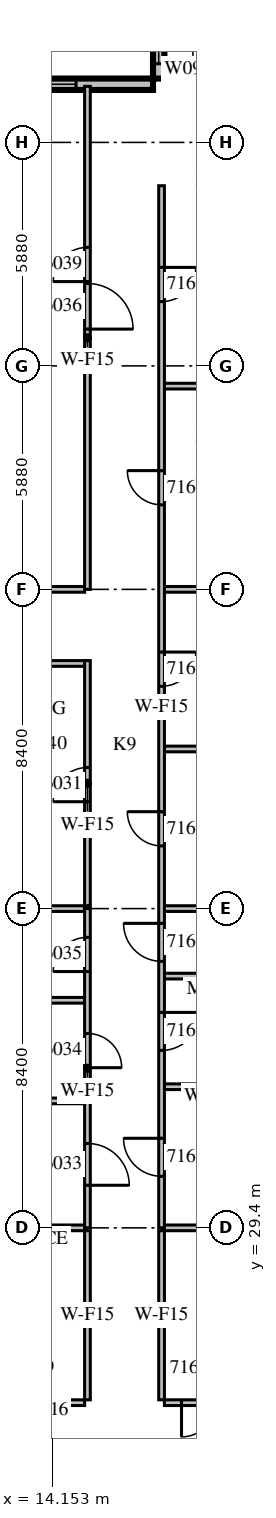
"""IFC4 building model, lengths in metres.
Left out: names, types, materials, properties, quantities, classifications, styles, units other than length and angle.
Written with IfcOpenShell. Run it as: python <this file> out.ifc"""

import sys

from ifc_helpers import new_model, si_unit, direction, frame, frame_2d, origin, place, context, subcontext, project, spatial, rectangle, extrude, source, transform, mapped, element, fill, save


model = new_model("IFC4")
c1 = context("Model", 3, precision=1e-05, world=origin(), true_north=direction((0.0, 1.0)))
c2 = subcontext(c1, "Body", "Model", "MODEL_VIEW")
j1 = project(units=[si_unit("LENGTHUNIT", "METRE"), si_unit("PLANEANGLEUNIT", "RADIAN")], contexts=[c1])
p1 = place(None, origin())
s1 = spatial("IfcSite", under=j1, at=p1, CompositionType="ELEMENT")
p2 = place(p1, origin())
s2 = spatial("IfcBuilding", under=s1, at=p2, CompositionType="ELEMENT")
p3 = place(p2, frame((0.0, 0.0, 78.3)))
s3 = spatial("IfcBuildingStorey", under=s2, at=p3, CompositionType="ELEMENT", Elevation=78.3)
m1 = source(origin(), c2, "Body", "SweptSolid", [
    extrude(rectangle(XDim=1.68, YDim=0.3, at=frame_2d((0.84, 0.0))), origin(), (0.0, 0.0, 1.0), 3.8),
])
p4 = place(p3, frame((16.95, 61.32, 0.0), z_axis=(0.0, 0.0, 1.0), x_axis=(0.0, -1.0, 0.0)))
e1 = element("IfcWall", 1, at=p4, inside=s3, PredefinedType="STANDARD", context=c2, shape_type="MappedRepresentation", body=[
    mapped(m1, transform((0.0, 0.0, 0.0), scale=1.0)),
])
m2 = source(origin(), c2, "Body", "SweptSolid", [
    extrude(rectangle(XDim=0.9, YDim=2.7, at=frame_2d((0.45, 1.35))), frame((0.0, 0.16, 0.0), z_axis=(0.0, -1.0, 0.0), x_axis=(1.0, 0.0, 0.0)), (0.0, 0.0, 1.0), 0.32),
])
p5 = place(p4, frame((0.39, 0.0, 0.6)))
e2 = element("IfcOpeningElement", 2, at=p5, cuts=e1, PredefinedType="OPENING", context=c2, shape_type="MappedRepresentation", body=[
    mapped(m2, transform((0.0, 0.0, 0.0), scale=1.0)),
])
p6 = place(p3, frame((16.8, 59.49, 0.0), z_axis=(0.0, 0.0, 1.0), x_axis=(-1.0, 0.0, 0.0)))
e3 = element("IfcWall", 3, at=p6, inside=s3, PredefinedType="STANDARD", context=c2, shape_type="SweptSolid", body=[
    extrude(rectangle(XDim=8.2, YDim=0.3, at=frame_2d((4.1, 0.0))), origin(), (0.0, 0.0, 1.0), 3.8),
])
m3 = source(origin(), c2, "Body", "SweptSolid", [
    extrude(rectangle(XDim=1.8, YDim=2.4, at=frame_2d((0.9, 1.2))), frame((0.0, 0.16, 0.0), z_axis=(0.0, -1.0, 0.0), x_axis=(1.0, 0.0, 0.0)), (0.0, 0.0, 1.0), 0.32),
])
p7 = place(p6, frame((2.025, 0.0, 0.0)))
e4 = element("IfcOpeningElement", 4, at=p7, cuts=e3, PredefinedType="OPENING", context=c2, shape_type="MappedRepresentation", body=[
    mapped(m3, transform((0.0, 0.0, 0.0), scale=1.0)),
])
m4 = source(origin(), c2, "Body", "SweptSolid", [
    extrude(rectangle(XDim=4.295, YDim=0.15, at=frame_2d((2.147, 0.0))), origin(), (0.0, 0.0, 1.0), 3.8),
])
p8 = place(p3, frame((10.705, 24.8, 0.0), z_axis=(0.0, 0.0, 1.0), x_axis=(1.0, 0.0, 0.0)))
e5 = element("IfcWall", 5, at=p8, inside=s3, PredefinedType="PARTITIONING", context=c2, shape_type="MappedRepresentation", body=[
    mapped(m4, transform((0.0, 0.0, 0.0), scale=1.0)),
])
m5 = source(origin(), c2, "Body", "SweptSolid", [
    extrude(rectangle(XDim=0.9, YDim=2.1, at=frame_2d((0.45, 1.05))), frame((0.0, 0.085, 0.0), z_axis=(0.0, -1.0, 0.0), x_axis=(1.0, 0.0, 0.0)), (0.0, 0.0, 1.0), 0.17),
])
p9 = place(p8, frame((2.283, 0.0, 0.0)))
e6 = element("IfcOpeningElement", 6, at=p9, cuts=e5, PredefinedType="OPENING", context=c2, shape_type="MappedRepresentation", body=[
    mapped(m5, transform((0.0, 0.0, 0.0), scale=1.0)),
])
m6 = source(origin(), c2, "Body", "SweptSolid", [
    extrude(rectangle(XDim=3.6, YDim=0.15, at=frame_2d((1.8, 0.0))), origin(), (0.0, 0.0, 1.0), 3.8),
])
p10 = place(p3, frame((17.1, 24.8, 0.0), z_axis=(0.0, 0.0, 1.0), x_axis=(1.0, 0.0, 0.0)))
e7 = element("IfcWall", 7, at=p10, inside=s3, PredefinedType="PARTITIONING", context=c2, shape_type="MappedRepresentation", body=[
    mapped(m6, transform((0.0, 0.0, 0.0), scale=1.0)),
])
p11 = place(p10, frame((0.45, 0.0, 0.0)))
e8 = element("IfcOpeningElement", 8, at=p11, cuts=e7, PredefinedType="OPENING", context=c2, shape_type="MappedRepresentation", body=[
    mapped(m5, transform((0.0, 0.0, 0.0), scale=1.0)),
])
m7 = source(origin(), c2, "Body", "SweptSolid", [
    extrude(rectangle(XDim=4.45, YDim=0.15, at=frame_2d((2.225, 0.0))), origin(), (0.0, 0.0, 1.0), 3.8),
])
for number, where, z_axis, x_axis in (
    (9, (15.075, 24.875, 0.0), (0.0, 0.0, 1.0), (0.0, 1.0, 0.0)),
    (10, (17.025, 29.325, 0.0), (0.0, 0.0, 1.0), (0.0, -1.0, 0.0)),
):
    element("IfcWall", number, at=place(p3, frame(where, z_axis=z_axis, x_axis=x_axis)), inside=s3, PredefinedType="PARTITIONING", context=c2, shape_type="MappedRepresentation", body=[
        mapped(m7, transform((0.0, 0.0, 0.0), scale=1.0)),
    ])
m8 = source(origin(), c2, "Body", "SweptSolid", [
    extrude(rectangle(XDim=3.901, YDim=0.15, at=frame_2d((1.95, 0.0))), origin(), (0.0, 0.0, 1.0), 3.8),
])
p12 = place(p3, frame((15.0, 29.4, 0.0), z_axis=(0.0, 0.0, 1.0), x_axis=(-1.0, 0.0, 0.0)))
e11 = element("IfcWall", 11, at=p12, inside=s3, PredefinedType="PARTITIONING", context=c2, shape_type="MappedRepresentation", body=[
    mapped(m8, transform((0.0, 0.0, 0.0), scale=1.0)),
])
m9 = source(origin(), c2, "Body", "SweptSolid", [
    extrude(rectangle(XDim=2.701, YDim=0.15, at=frame_2d((1.351, 0.0))), origin(), (0.0, 0.0, 1.0), 3.8),
])
p13 = place(p3, frame((19.801, 29.4, 0.0), z_axis=(0.0, 0.0, 1.0), x_axis=(-1.0, 0.0, 0.0)))
e12 = element("IfcWall", 12, at=p13, inside=s3, PredefinedType="PARTITIONING", context=c2, shape_type="MappedRepresentation", body=[
    mapped(m9, transform((0.0, 0.0, 0.0), scale=1.0)),
])
m10 = source(origin(), c2, "Body", "SweptSolid", [
    extrude(rectangle(XDim=3.575, YDim=0.15, at=frame_2d((1.788, 0.0))), origin(), (0.0, 0.0, 1.0), 3.8),
])
p14 = place(p3, frame((15.075, 44.25, 0.0), z_axis=(0.0, 0.0, 1.0), x_axis=(-1.0, 0.0, 0.0)))
e13 = element("IfcWall", 13, at=p14, inside=s3, PredefinedType="PARTITIONING", context=c2, shape_type="MappedRepresentation", body=[
    mapped(m10, transform((0.0, 0.0, 0.0), scale=1.0)),
])
m11 = source(origin(), c2, "Body", "SweptSolid", [
    extrude(rectangle(XDim=6.45, YDim=0.15, at=frame_2d((3.225, 0.0))), origin(), (0.0, 0.0, 1.0), 3.8),
])
p15 = place(p3, frame((15.075, 37.875, 0.0), z_axis=(0.0, 0.0, 1.0), x_axis=(0.0, 1.0, 0.0)))
e14 = element("IfcWall", 14, at=p15, inside=s3, PredefinedType="PARTITIONING", context=c2, shape_type="MappedRepresentation", body=[
    mapped(m11, transform((0.0, 0.0, 0.0), scale=1.0)),
])
p16 = place(p15, frame((2.737, 0.0, 0.0)))
e15 = element("IfcOpeningElement", 15, at=p16, cuts=e14, PredefinedType="OPENING", context=c2, shape_type="MappedRepresentation", body=[
    mapped(m5, transform((0.0, 0.0, 0.0), scale=1.0)),
])
for number, where, z_axis, x_axis in (
    (16, (15.0, 32.74, 0.0), (0.0, 0.0, 1.0), (-1.0, 0.0, 0.0)),
    (17, (15.0, 35.388, 0.0), (0.0, 0.0, 1.0), (-1.0, 0.0, 0.0)),
):
    element("IfcWall", number, at=place(p3, frame(where, z_axis=z_axis, x_axis=x_axis)), inside=s3, PredefinedType="PARTITIONING", context=c2, shape_type="MappedRepresentation", body=[
        mapped(m4, transform((0.0, 0.0, 0.0), scale=1.0)),
    ])
p17 = place(p3, frame((15.0, 37.8, 0.0), z_axis=(0.0, 0.0, 1.0), x_axis=(-1.0, 0.0, 0.0)))
e18 = element("IfcWall", 18, at=p17, inside=s3, PredefinedType="PARTITIONING", context=c2, shape_type="MappedRepresentation", body=[
    mapped(m8, transform((0.0, 0.0, 0.0), scale=1.0)),
])
m12 = source(origin(), c2, "Body", "SweptSolid", [
    extrude(rectangle(XDim=3.75, YDim=0.15, at=frame_2d((1.875, 0.0))), origin(), (0.0, 0.0, 1.0), 3.8),
])
p18 = place(p3, frame((15.0, 46.2, 0.0), z_axis=(0.0, 0.0, 1.0), x_axis=(-1.0, 0.0, 0.0)))
e19 = element("IfcWall", 19, at=p18, inside=s3, PredefinedType="PARTITIONING", context=c2, shape_type="MappedRepresentation", body=[
    mapped(m12, transform((0.0, 0.0, 0.0), scale=1.0)),
])
for number, where, z_axis, x_axis in (
    (20, (17.1, 33.113, 0.0), (0.0, 0.0, 1.0), (1.0, 0.0, 0.0)),
    (21, (17.1, 36.024, 0.0), (0.0, 0.0, 1.0), (1.0, 0.0, 0.0)),
    (22, (17.1, 42.0, 0.0), (0.0, 0.0, 1.0), (1.0, 0.0, 0.0)),
):
    element("IfcWall", number, at=place(p3, frame(where, z_axis=z_axis, x_axis=x_axis)), inside=s3, PredefinedType="PARTITIONING", context=c2, shape_type="MappedRepresentation", body=[
        mapped(m6, transform((0.0, 0.0, 0.0), scale=1.0)),
    ])
for number, where, z_axis, x_axis in (
    (23, (17.1, 51.547, 0.0), (0.0, 0.0, 1.0), (1.0, 0.0, 0.0)),
    (24, (19.801, 37.8, 0.0), (0.0, 0.0, 1.0), (-1.0, 0.0, 0.0)),
    (25, (19.801, 46.2, 0.0), (0.0, 0.0, 1.0), (-1.0, 0.0, 0.0)),
):
    element("IfcWall", number, at=place(p3, frame(where, z_axis=z_axis, x_axis=x_axis)), inside=s3, PredefinedType="PARTITIONING", context=c2, shape_type="MappedRepresentation", body=[
        mapped(m9, transform((0.0, 0.0, 0.0), scale=1.0)),
    ])
m13 = source(origin(), c2, "Body", "SweptSolid", [
    extrude(rectangle(XDim=8.4, YDim=0.15, at=frame_2d((4.2, 0.0))), origin(), (0.0, 0.0, 1.0), 3.8),
])
p19 = place(p3, frame((15.075, 29.4, 0.0), z_axis=(0.0, 0.0, 1.0), x_axis=(0.0, 1.0, 0.0)))
e26 = element("IfcWall", 26, at=p19, inside=s3, PredefinedType="PARTITIONING", context=c2, shape_type="MappedRepresentation", body=[
    mapped(m13, transform((0.0, 0.0, 0.0), scale=1.0)),
])
m14 = source(origin(), c2, "Body", "SweptSolid", [
    extrude(rectangle(XDim=1.1, YDim=2.1, at=frame_2d((0.55, 1.05))), frame((0.0, 0.085, 0.0), z_axis=(0.0, -1.0, 0.0), x_axis=(1.0, 0.0, 0.0)), (0.0, 0.0, 1.0), 0.17),
])
p20 = place(p19, frame((1.12, 0.0, 0.0)))
e27 = element("IfcOpeningElement", 27, at=p20, cuts=e26, PredefinedType="OPENING", context=c2, shape_type="MappedRepresentation", body=[
    mapped(m14, transform((0.0, 0.0, 0.0), scale=1.0)),
])
p21 = place(p19, frame((4.214, 0.0, 0.0)))
e28 = element("IfcOpeningElement", 28, at=p21, cuts=e26, PredefinedType="OPENING", context=c2, shape_type="MappedRepresentation", body=[
    mapped(m5, transform((0.0, 0.0, 0.0), scale=1.0)),
])
p22 = place(p19, frame((6.744, 0.0, 0.0)))
e29 = element("IfcOpeningElement", 29, at=p22, cuts=e26, PredefinedType="OPENING", context=c2, shape_type="MappedRepresentation", body=[
    mapped(m5, transform((0.0, 0.0, 0.0), scale=1.0)),
])
m15 = source(origin(), c2, "Body", "SweptSolid", [
    extrude(rectangle(XDim=13.235, YDim=0.15, at=frame_2d((6.617, 0.0))), origin(), (0.0, 0.0, 1.0), 3.8),
])
p23 = place(p3, frame((15.075, 46.2, 0.0), z_axis=(0.0, 0.0, 1.0), x_axis=(0.0, 1.0, 0.0)))
e30 = element("IfcWall", 30, at=p23, inside=s3, PredefinedType="PARTITIONING", context=c2, shape_type="MappedRepresentation", body=[
    mapped(m15, transform((0.0, 0.0, 0.0), scale=1.0)),
])
m16 = source(origin(), c2, "Body", "SweptSolid", [
    extrude(rectangle(XDim=1.2, YDim=2.1, at=frame_2d((0.6, 1.05))), frame((0.0, 0.085, 0.0), z_axis=(0.0, -1.0, 0.0), x_axis=(1.0, 0.0, 0.0)), (0.0, 0.0, 1.0), 0.17),
])
p24 = place(p23, frame((6.848, 0.0, 0.0)))
e31 = element("IfcOpeningElement", 31, at=p24, cuts=e30, PredefinedType="OPENING", context=c2, shape_type="MappedRepresentation", body=[
    mapped(m16, transform((0.0, 0.0, 0.0), scale=1.0)),
])
p25 = place(p23, frame((8.098, 0.0, 0.0)))
e32 = element("IfcOpeningElement", 32, at=p25, cuts=e30, PredefinedType="OPENING", context=c2, shape_type="MappedRepresentation", body=[
    mapped(m5, transform((0.0, 0.0, 0.0), scale=1.0)),
])
p26 = place(p3, frame((17.025, 56.82, 0.0), z_axis=(0.0, 0.0, 1.0), x_axis=(0.0, -1.0, 0.0)))
e33 = element("IfcWall", 33, at=p26, inside=s3, PredefinedType="PARTITIONING", context=c2, shape_type="SweptSolid", body=[
    extrude(rectangle(XDim=27.42, YDim=0.15, at=frame_2d((13.71, 0.0))), origin(), (0.0, 0.0, 1.0), 3.8),
])
m17 = source(origin(), c2, "Body", "SweptSolid", [
    extrude(rectangle(XDim=1.0, YDim=2.1, at=frame_2d((0.5, 1.05))), frame((0.0, 0.085, 0.0), z_axis=(0.0, -1.0, 0.0), x_axis=(1.0, 0.0, 0.0)), (0.0, 0.0, 1.0), 0.17),
])
p27 = place(p26, frame((25.063, 0.0, 0.0)))
e34 = element("IfcOpeningElement", 34, at=p27, cuts=e33, PredefinedType="OPENING", context=c2, shape_type="MappedRepresentation", body=[
    mapped(m17, transform((0.0, 0.0, 0.0), scale=1.0)),
])
p28 = place(p26, frame((21.751, 0.0, 0.0)))
e35 = element("IfcOpeningElement", 35, at=p28, cuts=e33, PredefinedType="OPENING", context=c2, shape_type="MappedRepresentation", body=[
    mapped(m17, transform((0.0, 0.0, 0.0), scale=1.0)),
])
p29 = place(p26, frame((19.408, 0.0, 0.0)))
e36 = element("IfcOpeningElement", 36, at=p29, cuts=e33, PredefinedType="OPENING", context=c2, shape_type="MappedRepresentation", body=[
    mapped(m17, transform((0.0, 0.0, 0.0), scale=1.0)),
])
p30 = place(p26, frame((16.47, 0.0, 0.0)))
e37 = element("IfcOpeningElement", 37, at=p30, cuts=e33, PredefinedType="OPENING", context=c2, shape_type="MappedRepresentation", body=[
    mapped(m5, transform((0.0, 0.0, 0.0), scale=1.0)),
])
p31 = place(p26, frame((12.27, 0.0, 0.0)))
e38 = element("IfcOpeningElement", 38, at=p31, cuts=e33, PredefinedType="OPENING", context=c2, shape_type="MappedRepresentation", body=[
    mapped(m5, transform((0.0, 0.0, 0.0), scale=1.0)),
])
p32 = place(p26, frame((7.496, 0.0, 0.0)))
e39 = element("IfcOpeningElement", 39, at=p32, cuts=e33, PredefinedType="OPENING", context=c2, shape_type="MappedRepresentation", body=[
    mapped(m5, transform((0.0, 0.0, 0.0), scale=1.0)),
])
p33 = place(p26, frame((2.149, 0.0, 0.0)))
e40 = element("IfcOpeningElement", 40, at=p33, cuts=e33, PredefinedType="OPENING", context=c2, shape_type="MappedRepresentation", body=[
    mapped(m5, transform((0.0, 0.0, 0.0), scale=1.0)),
])
m18 = source(origin(), c2, "Body", "SweptSolid", [
    extrude(rectangle(XDim=0.9, YDim=2.7, at=frame_2d((0.45, 1.35))), frame((0.0, 0.03, 0.0), z_axis=(0.0, -1.0, 0.0), x_axis=(1.0, 0.0, 0.0)), (0.0, 0.0, 1.0), 0.06),
])
p34 = place(p5, origin())
e41 = element("IfcWindow", 41, at=p34, inside=s3, PartitioningType="SINGLE_PANEL", PredefinedType="WINDOW", context=c2, shape_type="MappedRepresentation", body=[
    mapped(m18, transform((0.0, 0.0, 0.0), scale=1.0)),
])
fill(e2, e41)
m19 = source(origin(), c2, "Body", "SweptSolid", [
    extrude(rectangle(XDim=1.8, YDim=2.4, at=frame_2d((0.9, 1.2))), frame((0.0, 0.025, 0.0), z_axis=(0.0, -1.0, 0.0), x_axis=(1.0, 0.0, 0.0)), (0.0, 0.0, 1.0), 0.05),
])
p35 = place(p7, origin())
e42 = element("IfcDoor", 42, at=p35, inside=s3, OperationType="SLIDING_TO_LEFT", PredefinedType="DOOR", context=c2, shape_type="MappedRepresentation", body=[
    mapped(m19, transform((0.0, 0.0, 0.0), scale=1.0)),
])
fill(e4, e42)
m20 = source(origin(), c2, "Body", "SweptSolid", [
    extrude(rectangle(XDim=0.9, YDim=2.1, at=frame_2d((0.45, 1.05))), frame((0.0, 0.025, 0.0), z_axis=(0.0, -1.0, 0.0), x_axis=(1.0, 0.0, 0.0)), (0.0, 0.0, 1.0), 0.05),
])
p36 = place(p11, origin())
e43 = element("IfcDoor", 43, at=p36, inside=s3, OperationType="SINGLE_SWING_RIGHT", PredefinedType="DOOR", context=c2, shape_type="MappedRepresentation", body=[
    mapped(m20, transform((0.0, 0.0, 0.0), scale=1.0)),
])
fill(e8, e43)
p37 = place(p16, origin())
e44 = element("IfcDoor", 44, at=p37, inside=s3, OperationType="SINGLE_SWING_LEFT", PredefinedType="DOOR", context=c2, shape_type="MappedRepresentation", body=[
    mapped(m20, transform((0.0, 0.0, 0.0), scale=1.0)),
])
fill(e15, e44)
m21 = source(origin(), c2, "Body", "SweptSolid", [
    extrude(rectangle(XDim=1.1, YDim=2.1, at=frame_2d((0.55, 1.05))), frame((0.0, 0.025, 0.0), z_axis=(0.0, -1.0, 0.0), x_axis=(1.0, 0.0, 0.0)), (0.0, 0.0, 1.0), 0.05),
])
p38 = place(p20, origin())
e45 = element("IfcDoor", 45, at=p38, inside=s3, OperationType="SINGLE_SWING_RIGHT", PredefinedType="DOOR", context=c2, shape_type="MappedRepresentation", body=[
    mapped(m21, transform((0.0, 0.0, 0.0), scale=1.0)),
])
fill(e27, e45)
p39 = place(p21, origin())
e46 = element("IfcDoor", 46, at=p39, inside=s3, OperationType="SINGLE_SWING_RIGHT", PredefinedType="DOOR", context=c2, shape_type="MappedRepresentation", body=[
    mapped(m20, transform((0.0, 0.0, 0.0), scale=1.0)),
])
fill(e28, e46)
p40 = place(p22, origin())
e47 = element("IfcDoor", 47, at=p40, inside=s3, OperationType="SINGLE_SWING_LEFT", PredefinedType="DOOR", context=c2, shape_type="MappedRepresentation", body=[
    mapped(m20, transform((0.0, 0.0, 0.0), scale=1.0)),
])
fill(e29, e47)
m22 = source(origin(), c2, "Body", "SweptSolid", [
    extrude(rectangle(XDim=1.2, YDim=2.1, at=frame_2d((0.6, 1.05))), frame((0.0, 0.025, 0.0), z_axis=(0.0, -1.0, 0.0), x_axis=(1.0, 0.0, 0.0)), (0.0, 0.0, 1.0), 0.05),
])
p41 = place(p24, origin())
e48 = element("IfcDoor", 48, at=p41, inside=s3, OperationType="SINGLE_SWING_RIGHT", PredefinedType="DOOR", context=c2, shape_type="MappedRepresentation", body=[
    mapped(m22, transform((0.0, 0.0, 0.0), scale=1.0)),
])
fill(e31, e48)
p42 = place(p25, origin())
e49 = element("IfcDoor", 49, at=p42, inside=s3, OperationType="SINGLE_SWING_LEFT", PredefinedType="DOOR", context=c2, shape_type="MappedRepresentation", body=[
    mapped(m20, transform((0.0, 0.0, 0.0), scale=1.0)),
])
fill(e32, e49)
m23 = source(origin(), c2, "Body", "SweptSolid", [
    extrude(rectangle(XDim=1.0, YDim=2.1, at=frame_2d((0.5, 1.05))), frame((0.0, 0.025, 0.0), z_axis=(0.0, -1.0, 0.0), x_axis=(1.0, 0.0, 0.0)), (0.0, 0.0, 1.0), 0.05),
])
p43 = place(p27, origin())
e50 = element("IfcDoor", 50, at=p43, inside=s3, OperationType="SINGLE_SWING_RIGHT", PredefinedType="DOOR", context=c2, shape_type="MappedRepresentation", body=[
    mapped(m23, transform((0.0, 0.0, 0.0), scale=1.0)),
])
fill(e34, e50)
p44 = place(p28, origin())
e51 = element("IfcDoor", 51, at=p44, inside=s3, OperationType="SINGLE_SWING_LEFT", PredefinedType="DOOR", context=c2, shape_type="MappedRepresentation", body=[
    mapped(m23, transform((0.0, 0.0, 0.0), scale=1.0)),
])
fill(e35, e51)
p45 = place(p29, origin())
e52 = element("IfcDoor", 52, at=p45, inside=s3, OperationType="SINGLE_SWING_RIGHT", PredefinedType="DOOR", context=c2, shape_type="MappedRepresentation", body=[
    mapped(m23, transform((0.0, 0.0, 0.0), scale=1.0)),
])
fill(e36, e52)
p46 = place(p30, origin())
e53 = element("IfcDoor", 53, at=p46, inside=s3, OperationType="SINGLE_SWING_RIGHT", PredefinedType="DOOR", context=c2, shape_type="MappedRepresentation", body=[
    mapped(m20, transform((0.0, 0.0, 0.0), scale=1.0)),
])
fill(e37, e53)
p47 = place(p31, origin())
e54 = element("IfcDoor", 54, at=p47, inside=s3, OperationType="SINGLE_SWING_LEFT", PredefinedType="DOOR", context=c2, shape_type="MappedRepresentation", body=[
    mapped(m20, transform((0.0, 0.0, 0.0), scale=1.0)),
])
fill(e38, e54)
p48 = place(p32, origin())
e55 = element("IfcDoor", 55, at=p48, inside=s3, OperationType="SINGLE_SWING_RIGHT", PredefinedType="DOOR", context=c2, shape_type="MappedRepresentation", body=[
    mapped(m20, transform((0.0, 0.0, 0.0), scale=1.0)),
])
fill(e39, e55)
p49 = place(p33, origin())
e56 = element("IfcDoor", 56, at=p49, inside=s3, OperationType="SINGLE_SWING_LEFT", PredefinedType="DOOR", context=c2, shape_type="MappedRepresentation", body=[
    mapped(m20, transform((0.0, 0.0, 0.0), scale=1.0)),
])
fill(e40, e56)
save(model, sys.argv[1])
